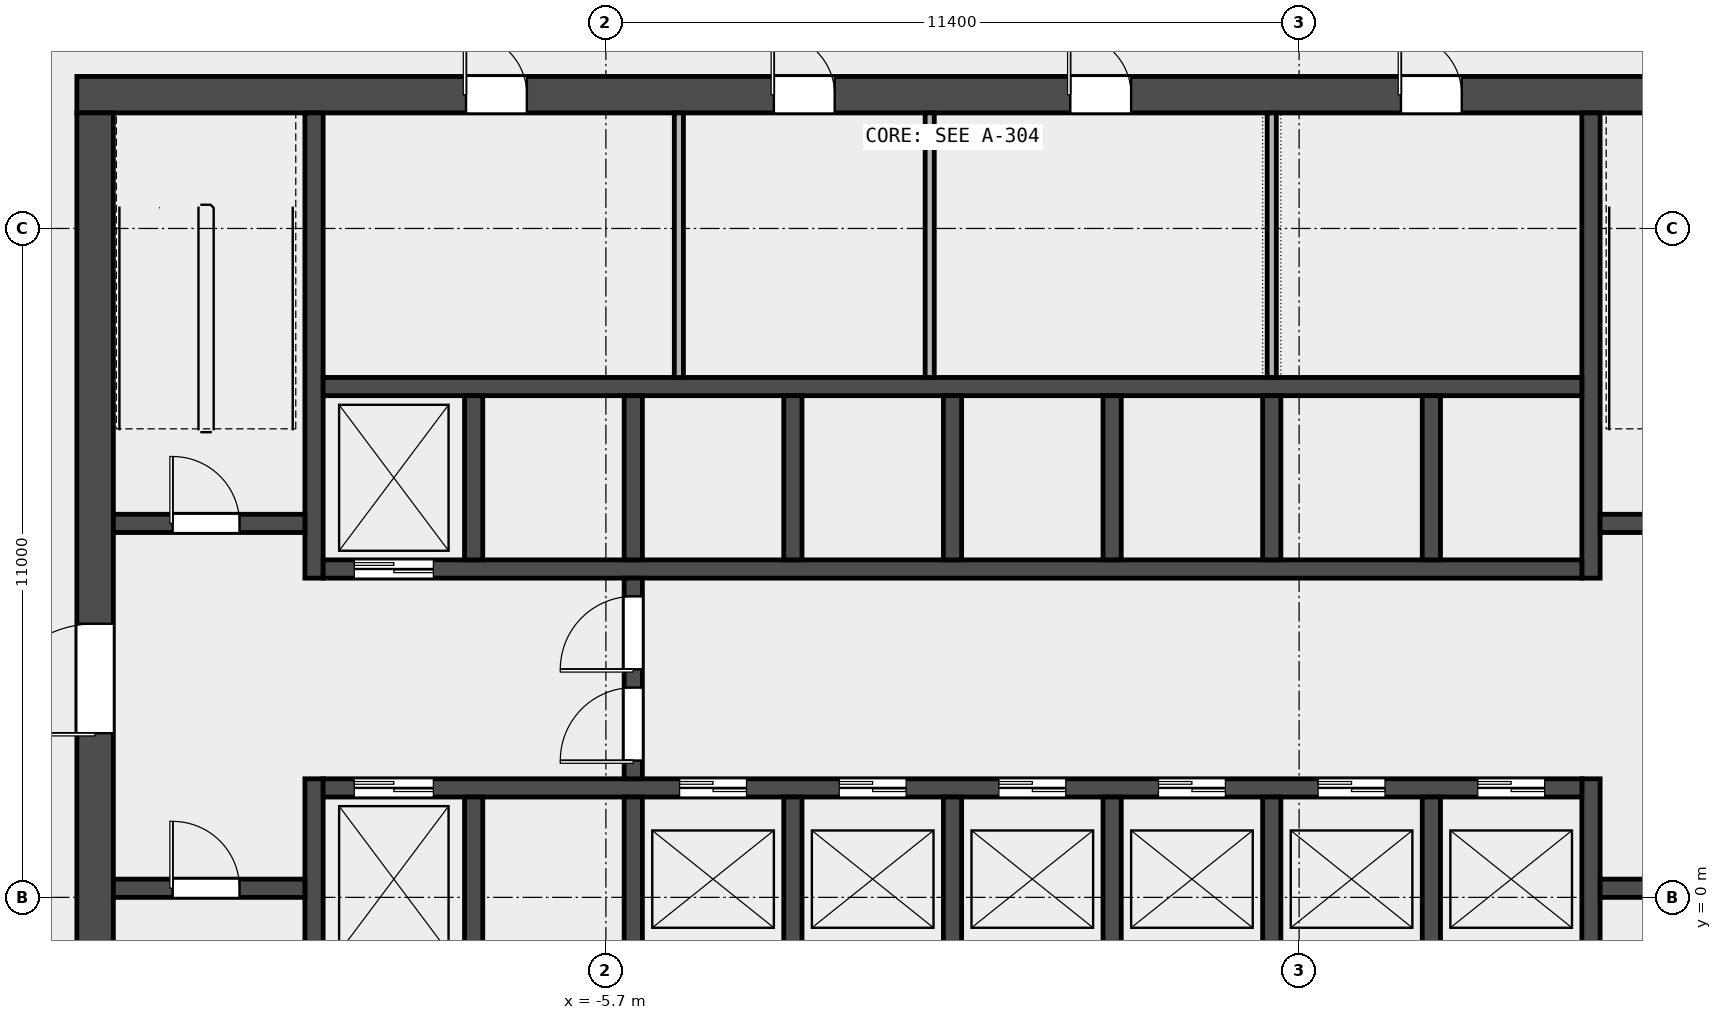
"""IFC4 building model, lengths in metres.
Left out: names, types, materials, properties, quantities, classifications, styles, units other than length and angle.
Written with IfcOpenShell. Run it as: python <this file> out.ifc"""

import sys

from ifc_helpers import new_model, si_unit, direction, frame, frame_2d, origin, place, context, subcontext, project, spatial, rectangle, extrude, element, fill, save


model = new_model("IFC4")
c1 = context("Model", 3, precision=1e-05, world=origin(), true_north=direction((0.0, 1.0)))
c2 = subcontext(c1, "Body", "Model", "MODEL_VIEW")
j1 = project(units=[si_unit("LENGTHUNIT", "METRE"), si_unit("PLANEANGLEUNIT", "RADIAN")], contexts=[c1])
p1 = place(None, origin())
s1 = spatial("IfcSite", under=j1, at=p1, CompositionType="ELEMENT")
p2 = place(p1, origin())
s2 = spatial("IfcBuilding", under=s1, at=p2, CompositionType="ELEMENT")
p3 = place(p2, frame((0.0, 0.0, 40.6)))
s3 = spatial("IfcBuildingStorey", under=s2, at=p3, CompositionType="ELEMENT", Elevation=40.6)
p4 = place(p3, frame((-14.4, 13.2, 0.0), z_axis=(0.0, 0.0, 1.0), x_axis=(1.0, 0.0, 0.0)))
e1 = element("IfcWall", 1, at=p4, inside=s3, PredefinedType="SHEAR", context=c2, shape_type="SweptSolid", body=[
    extrude(rectangle(XDim=28.8, YDim=0.6, at=frame_2d((14.4, 0.0))), origin(), (0.0, 0.0, 1.0), 4.5),
])
p5 = place(p4, frame((6.4, 0.0, 0.0)))
e2 = element("IfcOpeningElement", 2, at=p5, cuts=e1, PredefinedType="OPENING", context=c2, shape_type="SweptSolid", body=[
    extrude(rectangle(XDim=1.0, YDim=2.1, at=frame_2d((0.5, 1.05))), frame((0.0, 0.312, 0.0), z_axis=(0.0, -1.0, 0.0), x_axis=(1.0, 0.0, 0.0)), (0.0, 0.0, 1.0), 0.624),
])
p6 = place(p4, frame((11.462, 0.0, 0.0)))
e3 = element("IfcOpeningElement", 3, at=p6, cuts=e1, PredefinedType="OPENING", context=c2, shape_type="SweptSolid", body=[
    extrude(rectangle(XDim=1.0, YDim=2.1, at=frame_2d((0.5, 1.05))), frame((0.0, 0.312, 0.0), z_axis=(0.0, -1.0, 0.0), x_axis=(1.0, 0.0, 0.0)), (0.0, 0.0, 1.0), 0.624),
])
p7 = place(p4, frame((16.337, 0.0, 0.0)))
e4 = element("IfcOpeningElement", 4, at=p7, cuts=e1, PredefinedType="OPENING", context=c2, shape_type="SweptSolid", body=[
    extrude(rectangle(XDim=1.0, YDim=2.1, at=frame_2d((0.5, 1.05))), frame((0.0, 0.312, 0.0), z_axis=(0.0, -1.0, 0.0), x_axis=(1.0, 0.0, 0.0)), (0.0, 0.0, 1.0), 0.624),
])
p8 = place(p4, frame((21.775, 0.0, 0.0)))
e5 = element("IfcOpeningElement", 5, at=p8, cuts=e1, PredefinedType="OPENING", context=c2, shape_type="SweptSolid", body=[
    extrude(rectangle(XDim=1.0, YDim=2.1, at=frame_2d((0.5, 1.05))), frame((0.0, 0.312, 0.0), z_axis=(0.0, -1.0, 0.0), x_axis=(1.0, 0.0, 0.0)), (0.0, 0.0, 1.0), 0.624),
])
p9 = place(p3, frame((-14.1, -6.6, 0.0), z_axis=(0.0, 0.0, 1.0), x_axis=(0.0, 1.0, 0.0)))
e6 = element("IfcWall", 6, at=p9, inside=s3, PredefinedType="SHEAR", context=c2, shape_type="SweptSolid", body=[
    extrude(rectangle(XDim=19.5, YDim=0.6, at=frame_2d((9.75, 0.0))), origin(), (0.0, 0.0, 1.0), 4.5),
])
p10 = place(p9, frame((9.3, 0.0, 0.0)))
e7 = element("IfcOpeningElement", 7, at=p10, cuts=e6, PredefinedType="OPENING", context=c2, shape_type="SweptSolid", body=[
    extrude(rectangle(XDim=1.8, YDim=2.1, at=frame_2d((0.9, 1.05))), frame((0.0, 0.312, 0.0), z_axis=(0.0, -1.0, 0.0), x_axis=(1.0, 0.0, 0.0)), (0.0, 0.0, 1.0), 0.624),
])
p11 = place(p3, frame((-10.5, -6.6, 0.0), z_axis=(0.0, 0.0, 1.0), x_axis=(0.0, 1.0, 0.0)))
e8 = element("IfcWall", 8, at=p11, inside=s3, PredefinedType="SHEAR", context=c2, shape_type="SweptSolid", body=[
    extrude(rectangle(XDim=8.55, YDim=0.3, at=frame_2d((4.275, 0.0))), origin(), (0.0, 0.0, 1.0), 4.5),
])
p12 = place(p3, frame((-10.5, 5.25, 0.0), z_axis=(0.0, 0.0, 1.0), x_axis=(0.0, 1.0, 0.0)))
e9 = element("IfcWall", 9, at=p12, inside=s3, PredefinedType="SHEAR", context=c2, shape_type="SweptSolid", body=[
    extrude(rectangle(XDim=7.65, YDim=0.3, at=frame_2d((3.825, 0.0))), origin(), (0.0, 0.0, 1.0), 4.5),
])
p13 = place(p3, frame((10.5, -6.6, 0.0), z_axis=(0.0, 0.0, 1.0), x_axis=(0.0, 1.0, 0.0)))
e10 = element("IfcWall", 10, at=p13, inside=s3, PredefinedType="SHEAR", context=c2, shape_type="SweptSolid", body=[
    extrude(rectangle(XDim=8.55, YDim=0.3, at=frame_2d((4.275, 0.0))), origin(), (0.0, 0.0, 1.0), 4.5),
])
p14 = place(p3, frame((10.5, 5.25, 0.0), z_axis=(0.0, 0.0, 1.0), x_axis=(0.0, 1.0, 0.0)))
e11 = element("IfcWall", 11, at=p14, inside=s3, PredefinedType="SHEAR", context=c2, shape_type="SweptSolid", body=[
    extrude(rectangle(XDim=7.65, YDim=0.3, at=frame_2d((3.825, 0.0))), origin(), (0.0, 0.0, 1.0), 4.5),
])
p15 = place(p3, frame((-13.8, 0.15, 0.0), z_axis=(0.0, 0.0, 1.0), x_axis=(1.0, 0.0, 0.0)))
e12 = element("IfcWall", 12, at=p15, inside=s3, PredefinedType="SOLIDWALL", context=c2, shape_type="SweptSolid", body=[
    extrude(rectangle(XDim=3.15, YDim=0.3, at=frame_2d((1.575, 0.0))), origin(), (0.0, 0.0, 1.0), 4.5),
])
p16 = place(p15, frame((0.975, 0.0, 0.0)))
e13 = element("IfcOpeningElement", 13, at=p16, cuts=e12, PredefinedType="OPENING", context=c2, shape_type="SweptSolid", body=[
    extrude(rectangle(XDim=1.1, YDim=2.1, at=frame_2d((0.55, 1.05))), frame((0.0, 0.162, 0.0), z_axis=(0.0, -1.0, 0.0), x_axis=(1.0, 0.0, 0.0)), (0.0, 0.0, 1.0), 0.324),
])
p17 = place(p3, frame((-13.8, 6.15, 0.0), z_axis=(0.0, 0.0, 1.0), x_axis=(1.0, 0.0, 0.0)))
e14 = element("IfcWall", 14, at=p17, inside=s3, PredefinedType="SOLIDWALL", context=c2, shape_type="SweptSolid", body=[
    extrude(rectangle(XDim=3.15, YDim=0.3, at=frame_2d((1.575, 0.0))), origin(), (0.0, 0.0, 1.0), 4.5),
])
p18 = place(p17, frame((0.975, 0.0, 0.0)))
e15 = element("IfcOpeningElement", 15, at=p18, cuts=e14, PredefinedType="OPENING", context=c2, shape_type="SweptSolid", body=[
    extrude(rectangle(XDim=1.1, YDim=2.1, at=frame_2d((0.55, 1.05))), frame((0.0, 0.162, 0.0), z_axis=(0.0, -1.0, 0.0), x_axis=(1.0, 0.0, 0.0)), (0.0, 0.0, 1.0), 0.324),
])
p19 = place(p3, frame((10.65, 0.15, 0.0), z_axis=(0.0, 0.0, 1.0), x_axis=(1.0, 0.0, 0.0)))
e16 = element("IfcWall", 16, at=p19, inside=s3, PredefinedType="SOLIDWALL", context=c2, shape_type="SweptSolid", body=[
    extrude(rectangle(XDim=3.15, YDim=0.3, at=frame_2d((1.575, 0.0))), origin(), (0.0, 0.0, 1.0), 4.5),
])
p20 = place(p19, frame((1.025, 0.0, 0.0)))
e17 = element("IfcOpeningElement", 17, at=p20, cuts=e16, PredefinedType="OPENING", context=c2, shape_type="SweptSolid", body=[
    extrude(rectangle(XDim=1.1, YDim=2.1, at=frame_2d((0.55, 1.05))), frame((0.0, 0.162, 0.0), z_axis=(0.0, -1.0, 0.0), x_axis=(1.0, 0.0, 0.0)), (0.0, 0.0, 1.0), 0.324),
])
p21 = place(p3, frame((10.65, 6.15, 0.0), z_axis=(0.0, 0.0, 1.0), x_axis=(1.0, 0.0, 0.0)))
e18 = element("IfcWall", 18, at=p21, inside=s3, PredefinedType="SOLIDWALL", context=c2, shape_type="SweptSolid", body=[
    extrude(rectangle(XDim=3.15, YDim=0.3, at=frame_2d((1.575, 0.0))), origin(), (0.0, 0.0, 1.0), 4.5),
])
p22 = place(p21, frame((1.025, 0.0, 0.0)))
e19 = element("IfcOpeningElement", 19, at=p22, cuts=e18, PredefinedType="OPENING", context=c2, shape_type="SweptSolid", body=[
    extrude(rectangle(XDim=1.1, YDim=2.1, at=frame_2d((0.55, 1.05))), frame((0.0, 0.162, 0.0), z_axis=(0.0, -1.0, 0.0), x_axis=(1.0, 0.0, 0.0)), (0.0, 0.0, 1.0), 0.324),
])
p23 = place(p3, frame((-10.35, 1.8, 0.0), z_axis=(0.0, 0.0, 1.0), x_axis=(1.0, 0.0, 0.0)))
e20 = element("IfcWall", 20, at=p23, inside=s3, PredefinedType="SOLIDWALL", context=c2, shape_type="SweptSolid", body=[
    extrude(rectangle(XDim=20.7, YDim=0.3, at=frame_2d((10.35, 0.0))), origin(), (0.0, 0.0, 1.0), 4.5),
])
p24 = place(p23, frame((0.512, 0.0, 0.0)))
e21 = element("IfcOpeningElement", 21, at=p24, cuts=e20, PredefinedType="OPENING", context=c2, shape_type="SweptSolid", body=[
    extrude(rectangle(XDim=1.3, YDim=2.1, at=frame_2d((0.65, 1.05))), frame((0.0, 0.162, 0.0), z_axis=(0.0, -1.0, 0.0), x_axis=(1.0, 0.0, 0.0)), (0.0, 0.0, 1.0), 0.324),
])
p25 = place(p23, frame((5.863, 0.0, 0.0)))
e22 = element("IfcOpeningElement", 22, at=p25, cuts=e20, PredefinedType="OPENING", context=c2, shape_type="SweptSolid", body=[
    extrude(rectangle(XDim=1.1, YDim=2.1, at=frame_2d((0.55, 1.05))), frame((0.0, 0.162, 0.0), z_axis=(0.0, -1.0, 0.0), x_axis=(1.0, 0.0, 0.0)), (0.0, 0.0, 1.0), 0.324),
])
p26 = place(p23, frame((8.488, 0.0, 0.0)))
e23 = element("IfcOpeningElement", 23, at=p26, cuts=e20, PredefinedType="OPENING", context=c2, shape_type="SweptSolid", body=[
    extrude(rectangle(XDim=1.1, YDim=2.1, at=frame_2d((0.55, 1.05))), frame((0.0, 0.162, 0.0), z_axis=(0.0, -1.0, 0.0), x_axis=(1.0, 0.0, 0.0)), (0.0, 0.0, 1.0), 0.324),
])
p27 = place(p23, frame((11.113, 0.0, 0.0)))
e24 = element("IfcOpeningElement", 24, at=p27, cuts=e20, PredefinedType="OPENING", context=c2, shape_type="SweptSolid", body=[
    extrude(rectangle(XDim=1.1, YDim=2.1, at=frame_2d((0.55, 1.05))), frame((0.0, 0.162, 0.0), z_axis=(0.0, -1.0, 0.0), x_axis=(1.0, 0.0, 0.0)), (0.0, 0.0, 1.0), 0.324),
])
p28 = place(p23, frame((13.738, 0.0, 0.0)))
e25 = element("IfcOpeningElement", 25, at=p28, cuts=e20, PredefinedType="OPENING", context=c2, shape_type="SweptSolid", body=[
    extrude(rectangle(XDim=1.1, YDim=2.1, at=frame_2d((0.55, 1.05))), frame((0.0, 0.162, 0.0), z_axis=(0.0, -1.0, 0.0), x_axis=(1.0, 0.0, 0.0)), (0.0, 0.0, 1.0), 0.324),
])
p29 = place(p23, frame((16.363, 0.0, 0.0)))
e26 = element("IfcOpeningElement", 26, at=p29, cuts=e20, PredefinedType="OPENING", context=c2, shape_type="SweptSolid", body=[
    extrude(rectangle(XDim=1.1, YDim=2.1, at=frame_2d((0.55, 1.05))), frame((0.0, 0.162, 0.0), z_axis=(0.0, -1.0, 0.0), x_axis=(1.0, 0.0, 0.0)), (0.0, 0.0, 1.0), 0.324),
])
p30 = place(p23, frame((18.988, 0.0, 0.0)))
e27 = element("IfcOpeningElement", 27, at=p30, cuts=e20, PredefinedType="OPENING", context=c2, shape_type="SweptSolid", body=[
    extrude(rectangle(XDim=1.1, YDim=2.1, at=frame_2d((0.55, 1.05))), frame((0.0, 0.162, 0.0), z_axis=(0.0, -1.0, 0.0), x_axis=(1.0, 0.0, 0.0)), (0.0, 0.0, 1.0), 0.324),
])
p31 = place(p3, frame((-10.35, 5.4, 0.0), z_axis=(0.0, 0.0, 1.0), x_axis=(1.0, 0.0, 0.0)))
e28 = element("IfcWall", 28, at=p31, inside=s3, PredefinedType="SOLIDWALL", context=c2, shape_type="SweptSolid", body=[
    extrude(rectangle(XDim=20.7, YDim=0.3, at=frame_2d((10.35, 0.0))), origin(), (0.0, 0.0, 1.0), 4.5),
])
p32 = place(p31, frame((0.512, 0.0, 0.0)))
e29 = element("IfcOpeningElement", 29, at=p32, cuts=e28, PredefinedType="OPENING", context=c2, shape_type="SweptSolid", body=[
    extrude(rectangle(XDim=1.3, YDim=2.1, at=frame_2d((0.65, 1.05))), frame((0.0, 0.162, 0.0), z_axis=(0.0, -1.0, 0.0), x_axis=(1.0, 0.0, 0.0)), (0.0, 0.0, 1.0), 0.324),
])
p33 = place(p3, frame((-10.35, 8.4, 0.0), z_axis=(0.0, 0.0, 1.0), x_axis=(1.0, 0.0, 0.0)))
e30 = element("IfcWall", 30, at=p33, inside=s3, PredefinedType="SOLIDWALL", context=c2, shape_type="SweptSolid", body=[
    extrude(rectangle(XDim=20.7, YDim=0.3, at=frame_2d((10.35, 0.0))), origin(), (0.0, 0.0, 1.0), 4.5),
])
for number, where, z_axis, x_axis in (
    (31, (-7.875, -1.05, 0.0), (0.0, 0.0, 1.0), (0.0, 1.0, 0.0)),
    (32, (-5.25, -1.05, 0.0), (0.0, 0.0, 1.0), (0.0, 1.0, 0.0)),
    (33, (-2.625, -1.05, 0.0), (0.0, 0.0, 1.0), (0.0, 1.0, 0.0)),
    (34, (0.0, -1.05, 0.0), (0.0, 0.0, 1.0), (0.0, 1.0, 0.0)),
    (35, (2.625, -1.05, 0.0), (0.0, 0.0, 1.0), (0.0, 1.0, 0.0)),
    (36, (5.25, -1.05, 0.0), (0.0, 0.0, 1.0), (0.0, 1.0, 0.0)),
    (37, (7.875, -1.05, 0.0), (0.0, 0.0, 1.0), (0.0, 1.0, 0.0)),
    (38, (-7.875, 5.55, 0.0), (0.0, 0.0, 1.0), (0.0, 1.0, 0.0)),
    (39, (-5.25, 5.55, 0.0), (0.0, 0.0, 1.0), (0.0, 1.0, 0.0)),
    (40, (-2.625, 5.55, 0.0), (0.0, 0.0, 1.0), (0.0, 1.0, 0.0)),
    (41, (0.0, 5.55, 0.0), (0.0, 0.0, 1.0), (0.0, 1.0, 0.0)),
    (42, (2.625, 5.55, 0.0), (0.0, 0.0, 1.0), (0.0, 1.0, 0.0)),
    (43, (5.25, 5.55, 0.0), (0.0, 0.0, 1.0), (0.0, 1.0, 0.0)),
    (44, (7.875, 5.55, 0.0), (0.0, 0.0, 1.0), (0.0, 1.0, 0.0)),
):
    element("IfcWall", number, at=place(p3, frame(where, z_axis=z_axis, x_axis=x_axis)), inside=s3, PredefinedType="SOLIDWALL", context=c2, shape_type="SweptSolid", body=[
        extrude(rectangle(XDim=2.7, YDim=0.3, at=frame_2d((1.35, 0.0))), origin(), (0.0, 0.0, 1.0), 4.5),
    ])
p34 = place(p3, frame((-5.25, 1.95, 0.0), z_axis=(0.0, 0.0, 1.0), x_axis=(0.0, 1.0, 0.0)))
e45 = element("IfcWall", 45, at=p34, inside=s3, PredefinedType="SOLIDWALL", context=c2, shape_type="SweptSolid", body=[
    extrude(rectangle(XDim=3.3, YDim=0.3, at=frame_2d((1.65, 0.0))), origin(), (0.0, 0.0, 1.0), 4.5),
])
p35 = place(p34, frame((0.3, 0.0, 0.0)))
e46 = element("IfcOpeningElement", 46, at=p35, cuts=e45, PredefinedType="OPENING", context=c2, shape_type="SweptSolid", body=[
    extrude(rectangle(XDim=1.2, YDim=2.1, at=frame_2d((0.6, 1.05))), frame((0.0, 0.162, 0.0), z_axis=(0.0, -1.0, 0.0), x_axis=(1.0, 0.0, 0.0)), (0.0, 0.0, 1.0), 0.324),
])
p36 = place(p34, frame((1.8, 0.0, 0.0)))
e47 = element("IfcOpeningElement", 47, at=p36, cuts=e45, PredefinedType="OPENING", context=c2, shape_type="SweptSolid", body=[
    extrude(rectangle(XDim=1.2, YDim=2.1, at=frame_2d((0.6, 1.05))), frame((0.0, 0.162, 0.0), z_axis=(0.0, -1.0, 0.0), x_axis=(1.0, 0.0, 0.0)), (0.0, 0.0, 1.0), 0.324),
])
for number, where, z_axis, x_axis in (
    (48, (-4.5, 8.55, 0.0), (0.0, 0.0, 1.0), (0.0, 1.0, 0.0)),
    (49, (-0.375, 8.55, 0.0), (0.0, 0.0, 1.0), (0.0, 1.0, 0.0)),
    (50, (5.25, 8.55, 0.0), (0.0, 0.0, 1.0), (0.0, 1.0, 0.0)),
):
    element("IfcWall", number, at=place(p3, frame(where, z_axis=z_axis, x_axis=x_axis)), inside=s3, PredefinedType="PARTITIONING", context=c2, shape_type="SweptSolid", body=[
        extrude(rectangle(XDim=4.35, YDim=0.15, at=frame_2d((2.175, 0.0))), origin(), (0.0, 0.0, 1.0), 4.5),
    ])
p37 = place(p16, origin())
e51 = element("IfcDoor", 51, at=p37, inside=s3, OperationType="SINGLE_SWING_LEFT", PredefinedType="DOOR", context=c2, shape_type="SweptSolid", body=[
    extrude(rectangle(XDim=1.1, YDim=2.1, at=frame_2d((0.55, 1.05))), frame((0.0, 0.025, 0.0), z_axis=(0.0, -1.0, 0.0), x_axis=(1.0, 0.0, 0.0)), (0.0, 0.0, 1.0), 0.05),
])
fill(e13, e51)
p38 = place(p18, origin())
e52 = element("IfcDoor", 52, at=p38, inside=s3, OperationType="SINGLE_SWING_LEFT", PredefinedType="DOOR", context=c2, shape_type="SweptSolid", body=[
    extrude(rectangle(XDim=1.1, YDim=2.1, at=frame_2d((0.55, 1.05))), frame((0.0, 0.025, 0.0), z_axis=(0.0, -1.0, 0.0), x_axis=(1.0, 0.0, 0.0)), (0.0, 0.0, 1.0), 0.05),
])
fill(e15, e52)
p39 = place(p10, origin())
e53 = element("IfcDoor", 53, at=p39, inside=s3, OperationType="DOUBLE_DOOR_SINGLE_SWING", PredefinedType="DOOR", context=c2, shape_type="SweptSolid", body=[
    extrude(rectangle(XDim=1.8, YDim=2.1, at=frame_2d((0.9, 1.05))), frame((0.0, 0.025, 0.0), z_axis=(0.0, -1.0, 0.0), x_axis=(1.0, 0.0, 0.0)), (0.0, 0.0, 1.0), 0.05),
])
fill(e7, e53)
p40 = place(p35, origin())
e54 = element("IfcDoor", 54, at=p40, inside=s3, OperationType="SINGLE_SWING_LEFT", PredefinedType="DOOR", context=c2, shape_type="SweptSolid", body=[
    extrude(rectangle(XDim=1.2, YDim=2.1, at=frame_2d((0.6, 1.05))), frame((0.0, 0.025, 0.0), z_axis=(0.0, -1.0, 0.0), x_axis=(1.0, 0.0, 0.0)), (0.0, 0.0, 1.0), 0.05),
])
fill(e46, e54)
p41 = place(p36, origin())
e55 = element("IfcDoor", 55, at=p41, inside=s3, OperationType="SINGLE_SWING_RIGHT", PredefinedType="DOOR", context=c2, shape_type="SweptSolid", body=[
    extrude(rectangle(XDim=1.2, YDim=2.1, at=frame_2d((0.6, 1.05))), frame((0.0, 0.025, 0.0), z_axis=(0.0, -1.0, 0.0), x_axis=(1.0, 0.0, 0.0)), (0.0, 0.0, 1.0), 0.05),
])
fill(e47, e55)
p42 = place(p24, origin())
e56 = element("IfcDoor", 56, at=p42, inside=s3, OperationType="DOUBLE_DOOR_SLIDING", PredefinedType="DOOR", context=c2, shape_type="SweptSolid", body=[
    extrude(rectangle(XDim=1.3, YDim=2.1, at=frame_2d((0.65, 1.05))), frame((0.0, 0.025, 0.0), z_axis=(0.0, -1.0, 0.0), x_axis=(1.0, 0.0, 0.0)), (0.0, 0.0, 1.0), 0.05),
])
fill(e21, e56)
p43 = place(p25, origin())
e57 = element("IfcDoor", 57, at=p43, inside=s3, OperationType="DOUBLE_DOOR_SLIDING", PredefinedType="DOOR", context=c2, shape_type="SweptSolid", body=[
    extrude(rectangle(XDim=1.1, YDim=2.1, at=frame_2d((0.55, 1.05))), frame((0.0, 0.025, 0.0), z_axis=(0.0, -1.0, 0.0), x_axis=(1.0, 0.0, 0.0)), (0.0, 0.0, 1.0), 0.05),
])
fill(e22, e57)
p44 = place(p26, origin())
e58 = element("IfcDoor", 58, at=p44, inside=s3, OperationType="DOUBLE_DOOR_SLIDING", PredefinedType="DOOR", context=c2, shape_type="SweptSolid", body=[
    extrude(rectangle(XDim=1.1, YDim=2.1, at=frame_2d((0.55, 1.05))), frame((0.0, 0.025, 0.0), z_axis=(0.0, -1.0, 0.0), x_axis=(1.0, 0.0, 0.0)), (0.0, 0.0, 1.0), 0.05),
])
fill(e23, e58)
p45 = place(p27, origin())
e59 = element("IfcDoor", 59, at=p45, inside=s3, OperationType="DOUBLE_DOOR_SLIDING", PredefinedType="DOOR", context=c2, shape_type="SweptSolid", body=[
    extrude(rectangle(XDim=1.1, YDim=2.1, at=frame_2d((0.55, 1.05))), frame((0.0, 0.025, 0.0), z_axis=(0.0, -1.0, 0.0), x_axis=(1.0, 0.0, 0.0)), (0.0, 0.0, 1.0), 0.05),
])
fill(e24, e59)
p46 = place(p28, origin())
e60 = element("IfcDoor", 60, at=p46, inside=s3, OperationType="DOUBLE_DOOR_SLIDING", PredefinedType="DOOR", context=c2, shape_type="SweptSolid", body=[
    extrude(rectangle(XDim=1.1, YDim=2.1, at=frame_2d((0.55, 1.05))), frame((0.0, 0.025, 0.0), z_axis=(0.0, -1.0, 0.0), x_axis=(1.0, 0.0, 0.0)), (0.0, 0.0, 1.0), 0.05),
])
fill(e25, e60)
p47 = place(p29, origin())
e61 = element("IfcDoor", 61, at=p47, inside=s3, OperationType="DOUBLE_DOOR_SLIDING", PredefinedType="DOOR", context=c2, shape_type="SweptSolid", body=[
    extrude(rectangle(XDim=1.1, YDim=2.1, at=frame_2d((0.55, 1.05))), frame((0.0, 0.025, 0.0), z_axis=(0.0, -1.0, 0.0), x_axis=(1.0, 0.0, 0.0)), (0.0, 0.0, 1.0), 0.05),
])
fill(e26, e61)
p48 = place(p30, origin())
e62 = element("IfcDoor", 62, at=p48, inside=s3, OperationType="DOUBLE_DOOR_SLIDING", PredefinedType="DOOR", context=c2, shape_type="SweptSolid", body=[
    extrude(rectangle(XDim=1.1, YDim=2.1, at=frame_2d((0.55, 1.05))), frame((0.0, 0.025, 0.0), z_axis=(0.0, -1.0, 0.0), x_axis=(1.0, 0.0, 0.0)), (0.0, 0.0, 1.0), 0.05),
])
fill(e27, e62)
p49 = place(p32, origin())
e63 = element("IfcDoor", 63, at=p49, inside=s3, OperationType="DOUBLE_DOOR_SLIDING", PredefinedType="DOOR", context=c2, shape_type="SweptSolid", body=[
    extrude(rectangle(XDim=1.3, YDim=2.1, at=frame_2d((0.65, 1.05))), frame((0.0, 0.025, 0.0), z_axis=(0.0, -1.0, 0.0), x_axis=(1.0, 0.0, 0.0)), (0.0, 0.0, 1.0), 0.05),
])
fill(e29, e63)
p50 = place(p5, origin())
e64 = element("IfcDoor", 64, at=p50, inside=s3, OperationType="SINGLE_SWING_LEFT", PredefinedType="DOOR", context=c2, shape_type="SweptSolid", body=[
    extrude(rectangle(XDim=1.0, YDim=2.1, at=frame_2d((0.5, 1.05))), frame((0.0, 0.025, 0.0), z_axis=(0.0, -1.0, 0.0), x_axis=(1.0, 0.0, 0.0)), (0.0, 0.0, 1.0), 0.05),
])
fill(e2, e64)
p51 = place(p6, origin())
e65 = element("IfcDoor", 65, at=p51, inside=s3, OperationType="SINGLE_SWING_LEFT", PredefinedType="DOOR", context=c2, shape_type="SweptSolid", body=[
    extrude(rectangle(XDim=1.0, YDim=2.1, at=frame_2d((0.5, 1.05))), frame((0.0, 0.025, 0.0), z_axis=(0.0, -1.0, 0.0), x_axis=(1.0, 0.0, 0.0)), (0.0, 0.0, 1.0), 0.05),
])
fill(e3, e65)
p52 = place(p7, origin())
e66 = element("IfcDoor", 66, at=p52, inside=s3, OperationType="SINGLE_SWING_LEFT", PredefinedType="DOOR", context=c2, shape_type="SweptSolid", body=[
    extrude(rectangle(XDim=1.0, YDim=2.1, at=frame_2d((0.5, 1.05))), frame((0.0, 0.025, 0.0), z_axis=(0.0, -1.0, 0.0), x_axis=(1.0, 0.0, 0.0)), (0.0, 0.0, 1.0), 0.05),
])
fill(e4, e66)
p53 = place(p8, origin())
e67 = element("IfcDoor", 67, at=p53, inside=s3, OperationType="SINGLE_SWING_LEFT", PredefinedType="DOOR", context=c2, shape_type="SweptSolid", body=[
    extrude(rectangle(XDim=1.0, YDim=2.1, at=frame_2d((0.5, 1.05))), frame((0.0, 0.025, 0.0), z_axis=(0.0, -1.0, 0.0), x_axis=(1.0, 0.0, 0.0)), (0.0, 0.0, 1.0), 0.05),
])
fill(e5, e67)
save(model, sys.argv[1])
